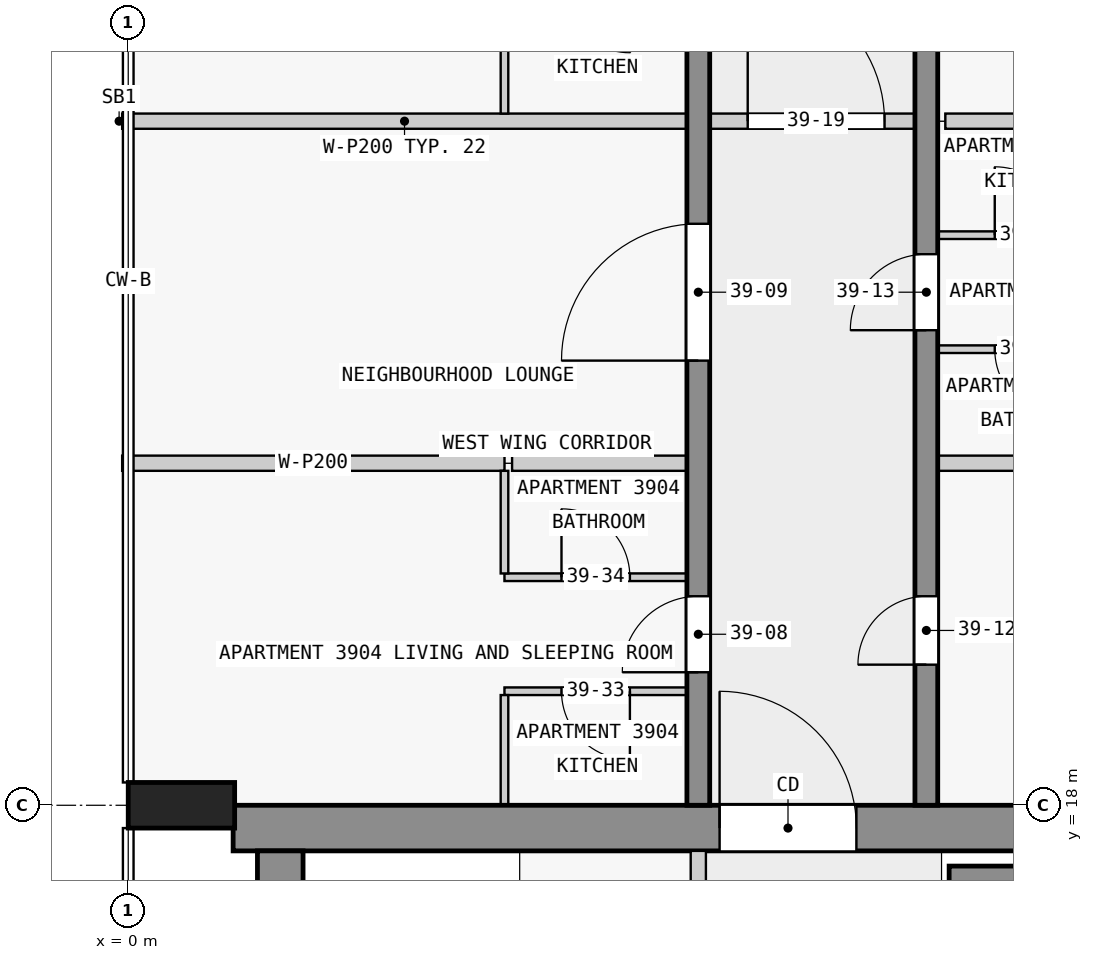
"""IFC4 building model, lengths in metres.
Left out: names, types, materials, properties, quantities, classifications, styles, units other than length and angle.
Written with IfcOpenShell. Run it as: python <this file> out.ifc"""

import sys

from ifc_helpers import new_model, si_unit, direction, frame, frame_2d, origin, origin_2d, place, context, subcontext, project, spatial, rectangle, extrude, element, fill, save


model = new_model("IFC4")
c1 = context("Model", 3, precision=1e-05, world=origin(), true_north=direction((0.0, 1.0)))
c2 = subcontext(c1, "Body", "Model", "MODEL_VIEW")
j1 = project(units=[si_unit("LENGTHUNIT", "METRE"), si_unit("PLANEANGLEUNIT", "RADIAN")], contexts=[c1])
p1 = place(None, origin())
s1 = spatial("IfcSite", under=j1, at=p1, CompositionType="ELEMENT")
p2 = place(p1, origin())
s2 = spatial("IfcBuilding", under=s1, at=p2, CompositionType="ELEMENT")
p3 = place(p2, frame((0.0, 0.0, 153.4)))
s3 = spatial("IfcBuildingStorey", under=s2, at=p3, CompositionType="ELEMENT", Elevation=153.4)
p4 = place(p3, frame((0.7, 18.0, 0.0), z_axis=(0.0, 0.0, 1.0), x_axis=(0.0, 1.0, 0.0)))
e1 = element("IfcColumn", 1, at=p4, inside=s3, PredefinedType="COLUMN", context=c2, shape_type="SweptSolid", body=[
    extrude(rectangle(XDim=0.6, YDim=1.4, at=origin_2d()), origin(), (0.0, 0.0, 1.0), 3.5),
])
p5 = place(p3, frame((1.38, 17.7, 0.0), z_axis=(0.0, 0.0, 1.0), x_axis=(1.0, 0.0, 0.0)))
e2 = element("IfcWall", 2, at=p5, inside=s3, PredefinedType="SHEAR", context=c2, shape_type="SweptSolid", body=[
    extrude(rectangle(XDim=21.12, YDim=0.6, at=frame_2d((10.56, 0.0))), origin(), (0.0, 0.0, 1.0), 3.25),
])
p6 = place(p5, frame((6.4, 0.0, 0.0)))
e3 = element("IfcOpeningElement", 3, at=p6, cuts=e2, PredefinedType="OPENING", context=c2, shape_type="SweptSolid", body=[
    extrude(rectangle(XDim=1.8, YDim=2.1, at=frame_2d((0.9, 1.05))), frame((0.0, 0.31, 0.0), z_axis=(0.0, -1.0, 0.0), x_axis=(1.0, 0.0, 0.0)), (0.0, 0.0, 1.0), 0.62),
])
p7 = place(p3, frame((2.0, 2.5, 0.0), z_axis=(0.0, 0.0, 1.0), x_axis=(0.0, 1.0, 0.0)))
e4 = element("IfcWall", 4, at=p7, inside=s3, PredefinedType="SHEAR", context=c2, shape_type="SweptSolid", body=[
    extrude(rectangle(XDim=14.9, YDim=0.6, at=frame_2d((7.45, 0.0))), origin(), (0.0, 0.0, 1.0), 3.25),
])
p8 = place(p3, frame((10.8, 17.05, 0.0), z_axis=(0.0, 0.0, 1.0), x_axis=(1.0, 0.0, 0.0)))
e5 = element("IfcWall", 5, at=p8, inside=s3, PredefinedType="SHEAR", context=c2, shape_type="SweptSolid", body=[
    extrude(rectangle(XDim=7.8, YDim=0.3, at=frame_2d((3.9, 0.0))), origin(), (0.0, 0.0, 1.0), 3.25),
])
p9 = place(p3, frame((7.5, 18.0, 0.0), z_axis=(0.0, 0.0, 1.0), x_axis=(0.0, 1.0, 0.0)))
e6 = element("IfcWall", 6, at=p9, inside=s3, PredefinedType="SHEAR", context=c2, shape_type="SweptSolid", body=[
    extrude(rectangle(XDim=27.0, YDim=0.3, at=frame_2d((13.5, 0.0))), origin(), (0.0, 0.0, 1.0), 3.25),
])
p10 = place(p9, frame((1.75, 0.0, 0.0)))
e7 = element("IfcOpeningElement", 7, at=p10, cuts=e6, PredefinedType="OPENING", context=c2, shape_type="SweptSolid", body=[
    extrude(rectangle(XDim=1.0, YDim=2.1, at=frame_2d((0.5, 1.05))), frame((0.0, 0.16, 0.0), z_axis=(0.0, -1.0, 0.0), x_axis=(1.0, 0.0, 0.0)), (0.0, 0.0, 1.0), 0.32),
])
p11 = place(p9, frame((5.85, 0.0, 0.0)))
e8 = element("IfcOpeningElement", 8, at=p11, cuts=e6, PredefinedType="OPENING", context=c2, shape_type="SweptSolid", body=[
    extrude(rectangle(XDim=1.8, YDim=2.1, at=frame_2d((0.9, 1.05))), frame((0.0, 0.16, 0.0), z_axis=(0.0, -1.0, 0.0), x_axis=(1.0, 0.0, 0.0)), (0.0, 0.0, 1.0), 0.32),
])
p12 = place(p9, frame((13.05, 0.0, 0.0)))
e9 = element("IfcOpeningElement", 9, at=p12, cuts=e6, PredefinedType="OPENING", context=c2, shape_type="SweptSolid", body=[
    extrude(rectangle(XDim=1.0, YDim=2.1, at=frame_2d((0.5, 1.05))), frame((0.0, 0.16, 0.0), z_axis=(0.0, -1.0, 0.0), x_axis=(1.0, 0.0, 0.0)), (0.0, 0.0, 1.0), 0.32),
])
p13 = place(p9, frame((21.35, 0.0, 0.0)))
e10 = element("IfcOpeningElement", 10, at=p13, cuts=e6, PredefinedType="OPENING", context=c2, shape_type="SweptSolid", body=[
    extrude(rectangle(XDim=1.0, YDim=2.1, at=frame_2d((0.5, 1.05))), frame((0.0, 0.16, 0.0), z_axis=(0.0, -1.0, 0.0), x_axis=(1.0, 0.0, 0.0)), (0.0, 0.0, 1.0), 0.32),
])
p14 = place(p3, frame((10.5, 18.0, 0.0), z_axis=(0.0, 0.0, 1.0), x_axis=(0.0, 1.0, 0.0)))
e11 = element("IfcWall", 11, at=p14, inside=s3, PredefinedType="SHEAR", context=c2, shape_type="SweptSolid", body=[
    extrude(rectangle(XDim=27.0, YDim=0.3, at=frame_2d((13.5, 0.0))), origin(), (0.0, 0.0, 1.0), 3.25),
])
p15 = place(p14, frame((1.85, 0.0, 0.0)))
e12 = element("IfcOpeningElement", 12, at=p15, cuts=e11, PredefinedType="OPENING", context=c2, shape_type="SweptSolid", body=[
    extrude(rectangle(XDim=0.9, YDim=2.1, at=frame_2d((0.45, 1.05))), frame((0.0, 0.16, 0.0), z_axis=(0.0, -1.0, 0.0), x_axis=(1.0, 0.0, 0.0)), (0.0, 0.0, 1.0), 0.32),
])
p16 = place(p14, frame((6.25, 0.0, 0.0)))
e13 = element("IfcOpeningElement", 13, at=p16, cuts=e11, PredefinedType="OPENING", context=c2, shape_type="SweptSolid", body=[
    extrude(rectangle(XDim=1.0, YDim=2.1, at=frame_2d((0.5, 1.05))), frame((0.0, 0.16, 0.0), z_axis=(0.0, -1.0, 0.0), x_axis=(1.0, 0.0, 0.0)), (0.0, 0.0, 1.0), 0.32),
])
p17 = place(p14, frame((10.85, 0.0, 0.0)))
e14 = element("IfcOpeningElement", 14, at=p17, cuts=e11, PredefinedType="OPENING", context=c2, shape_type="SweptSolid", body=[
    extrude(rectangle(XDim=0.9, YDim=2.1, at=frame_2d((0.45, 1.05))), frame((0.0, 0.16, 0.0), z_axis=(0.0, -1.0, 0.0), x_axis=(1.0, 0.0, 0.0)), (0.0, 0.0, 1.0), 0.32),
])
p18 = place(p14, frame((17.55, 0.0, 0.0)))
e15 = element("IfcOpeningElement", 15, at=p18, cuts=e11, PredefinedType="OPENING", context=c2, shape_type="SweptSolid", body=[
    extrude(rectangle(XDim=1.0, YDim=2.1, at=frame_2d((0.5, 1.05))), frame((0.0, 0.16, 0.0), z_axis=(0.0, -1.0, 0.0), x_axis=(1.0, 0.0, 0.0)), (0.0, 0.0, 1.0), 0.32),
])
p19 = place(p14, frame((23.25, 0.0, 0.0)))
e16 = element("IfcOpeningElement", 16, at=p19, cuts=e11, PredefinedType="OPENING", context=c2, shape_type="SweptSolid", body=[
    extrude(rectangle(XDim=0.9, YDim=2.1, at=frame_2d((0.45, 1.05))), frame((0.0, 0.16, 0.0), z_axis=(0.0, -1.0, 0.0), x_axis=(1.0, 0.0, 0.0)), (0.0, 0.0, 1.0), 0.32),
])
p20 = place(p14, frame((25.45, 0.0, 0.0)))
e17 = element("IfcOpeningElement", 17, at=p20, cuts=e11, PredefinedType="OPENING", context=c2, shape_type="SweptSolid", body=[
    extrude(rectangle(XDim=1.0, YDim=2.1, at=frame_2d((0.5, 1.05))), frame((0.0, 0.16, 0.0), z_axis=(0.0, -1.0, 0.0), x_axis=(1.0, 0.0, 0.0)), (0.0, 0.0, 1.0), 0.32),
])
p21 = place(p3, frame((7.5, 10.1, 0.0), z_axis=(0.0, 0.0, 1.0), x_axis=(0.0, 1.0, 0.0)))
e18 = element("IfcWall", 18, at=p21, inside=s3, PredefinedType="PARTITIONING", context=c2, shape_type="SweptSolid", body=[
    extrude(rectangle(XDim=7.3, YDim=0.2, at=frame_2d((3.65, 0.0))), origin(), (0.0, 0.0, 1.0), 3.25),
])
p22 = place(p21, frame((0.75, 0.0, 0.0)))
e19 = element("IfcOpeningElement", 19, at=p22, cuts=e18, PredefinedType="OPENING", context=c2, shape_type="SweptSolid", body=[
    extrude(rectangle(XDim=0.9, YDim=2.1, at=frame_2d((0.45, 1.05))), frame((0.0, 0.11, 0.0), z_axis=(0.0, -1.0, 0.0), x_axis=(1.0, 0.0, 0.0)), (0.0, 0.0, 1.0), 0.22),
])
p23 = place(p21, frame((3.175, 0.0, 0.0)))
e20 = element("IfcOpeningElement", 20, at=p23, cuts=e18, PredefinedType="OPENING", context=c2, shape_type="SweptSolid", body=[
    extrude(rectangle(XDim=0.9, YDim=2.1, at=frame_2d((0.45, 1.05))), frame((0.0, 0.11, 0.0), z_axis=(0.0, -1.0, 0.0), x_axis=(1.0, 0.0, 0.0)), (0.0, 0.0, 1.0), 0.22),
])
p24 = place(p21, frame((5.25, 0.0, 0.0)))
e21 = element("IfcOpeningElement", 21, at=p24, cuts=e18, PredefinedType="OPENING", context=c2, shape_type="SweptSolid", body=[
    extrude(rectangle(XDim=0.9, YDim=2.1, at=frame_2d((0.45, 1.05))), frame((0.0, 0.11, 0.0), z_axis=(0.0, -1.0, 0.0), x_axis=(1.0, 0.0, 0.0)), (0.0, 0.0, 1.0), 0.22),
])
p25 = place(p3, frame((7.35, 19.5, 0.0), z_axis=(0.0, 0.0, 1.0), x_axis=(-1.0, 0.0, 0.0)))
e22 = element("IfcWall", 22, at=p25, inside=s3, PredefinedType="PARTITIONING", context=c2, shape_type="SweptSolid", body=[
    extrude(rectangle(XDim=2.4, YDim=0.1, at=frame_2d((1.2, 0.0))), origin(), (0.0, 0.0, 1.0), 3.25),
])
p26 = place(p25, frame((0.75, 0.0, 0.0)))
e23 = element("IfcOpeningElement", 23, at=p26, cuts=e22, PredefinedType="OPENING", context=c2, shape_type="SweptSolid", body=[
    extrude(rectangle(XDim=0.9, YDim=2.1, at=frame_2d((0.45, 1.05))), frame((0.0, 0.06, 0.0), z_axis=(0.0, -1.0, 0.0), x_axis=(1.0, 0.0, 0.0)), (0.0, 0.0, 1.0), 0.12),
])
p27 = place(p3, frame((4.95, 21.0, 0.0), z_axis=(0.0, 0.0, 1.0), x_axis=(1.0, 0.0, 0.0)))
e24 = element("IfcWall", 24, at=p27, inside=s3, PredefinedType="PARTITIONING", context=c2, shape_type="SweptSolid", body=[
    extrude(rectangle(XDim=2.4, YDim=0.1, at=frame_2d((1.2, 0.0))), origin(), (0.0, 0.0, 1.0), 3.25),
])
p28 = place(p27, frame((0.75, 0.0, 0.0)))
e25 = element("IfcOpeningElement", 25, at=p28, cuts=e24, PredefinedType="OPENING", context=c2, shape_type="SweptSolid", body=[
    extrude(rectangle(XDim=0.9, YDim=2.1, at=frame_2d((0.45, 1.05))), frame((0.0, 0.06, 0.0), z_axis=(0.0, -1.0, 0.0), x_axis=(1.0, 0.0, 0.0)), (0.0, 0.0, 1.0), 0.12),
])
p29 = place(p3, frame((7.35, 22.5, 0.0), z_axis=(0.0, 0.0, 1.0), x_axis=(-1.0, 0.0, 0.0)))
e26 = element("IfcWall", 26, at=p29, inside=s3, PredefinedType="PARTITIONING", context=c2, shape_type="SweptSolid", body=[
    extrude(rectangle(XDim=2.3, YDim=0.2, at=frame_2d((1.15, 0.0))), origin(), (0.0, 0.0, 1.0), 3.25),
])
p30 = place(p3, frame((17.85, 22.5, 0.0), z_axis=(0.0, 0.0, 1.0), x_axis=(-1.0, 0.0, 0.0)))
e27 = element("IfcWall", 27, at=p30, inside=s3, PredefinedType="PARTITIONING", context=c2, shape_type="SweptSolid", body=[
    extrude(rectangle(XDim=7.2, YDim=0.2, at=frame_2d((3.6, 0.0))), origin(), (0.0, 0.0, 1.0), 3.25),
])
p31 = place(p3, frame((-0.08, 22.5, 0.0), z_axis=(0.0, 0.0, 1.0), x_axis=(1.0, 0.0, 0.0)))
e28 = element("IfcWall", 28, at=p31, inside=s3, PredefinedType="PARTITIONING", context=c2, shape_type="SweptSolid", body=[
    extrude(rectangle(XDim=5.03, YDim=0.2, at=frame_2d((2.515, 0.0))), origin(), (0.0, 0.0, 1.0), 3.25),
])
p32 = place(p3, frame((13.05, 24.0, 0.0), z_axis=(0.0, 0.0, 1.0), x_axis=(-1.0, 0.0, 0.0)))
e29 = element("IfcWall", 29, at=p32, inside=s3, PredefinedType="PARTITIONING", context=c2, shape_type="SweptSolid", body=[
    extrude(rectangle(XDim=2.4, YDim=0.1, at=frame_2d((1.2, 0.0))), origin(), (0.0, 0.0, 1.0), 3.25),
])
p33 = place(p32, frame((0.75, 0.0, 0.0)))
e30 = element("IfcOpeningElement", 30, at=p33, cuts=e29, PredefinedType="OPENING", context=c2, shape_type="SweptSolid", body=[
    extrude(rectangle(XDim=0.9, YDim=2.1, at=frame_2d((0.45, 1.05))), frame((0.0, 0.06, 0.0), z_axis=(0.0, -1.0, 0.0), x_axis=(1.0, 0.0, 0.0)), (0.0, 0.0, 1.0), 0.12),
])
p34 = place(p3, frame((10.65, 25.5, 0.0), z_axis=(0.0, 0.0, 1.0), x_axis=(1.0, 0.0, 0.0)))
e31 = element("IfcWall", 31, at=p34, inside=s3, PredefinedType="PARTITIONING", context=c2, shape_type="SweptSolid", body=[
    extrude(rectangle(XDim=2.4, YDim=0.1, at=frame_2d((1.2, 0.0))), origin(), (0.0, 0.0, 1.0), 3.25),
])
p35 = place(p34, frame((0.75, 0.0, 0.0)))
e32 = element("IfcOpeningElement", 32, at=p35, cuts=e31, PredefinedType="OPENING", context=c2, shape_type="SweptSolid", body=[
    extrude(rectangle(XDim=0.9, YDim=2.1, at=frame_2d((0.45, 1.05))), frame((0.0, 0.06, 0.0), z_axis=(0.0, -1.0, 0.0), x_axis=(1.0, 0.0, 0.0)), (0.0, 0.0, 1.0), 0.12),
])
p36 = place(p3, frame((7.35, 27.0, 0.0), z_axis=(0.0, 0.0, 1.0), x_axis=(-1.0, 0.0, 0.0)))
e33 = element("IfcWall", 33, at=p36, inside=s3, PredefinedType="PARTITIONING", context=c2, shape_type="SweptSolid", body=[
    extrude(rectangle(XDim=7.43, YDim=0.2, at=frame_2d((3.715, 0.0))), origin(), (0.0, 0.0, 1.0), 3.25),
])
p37 = place(p3, frame((12.95, 27.0, 0.0), z_axis=(0.0, 0.0, 1.0), x_axis=(-1.0, 0.0, 0.0)))
e34 = element("IfcWall", 34, at=p37, inside=s3, PredefinedType="PARTITIONING", context=c2, shape_type="SweptSolid", body=[
    extrude(rectangle(XDim=2.2, YDim=0.2, at=frame_2d((1.1, 0.0))), origin(), (0.0, 0.0, 1.0), 3.25),
])
p38 = place(p3, frame((4.95, 19.45, 0.0), z_axis=(0.0, 0.0, 1.0), x_axis=(0.0, -1.0, 0.0)))
e35 = element("IfcWall", 35, at=p38, inside=s3, PredefinedType="PARTITIONING", context=c2, shape_type="SweptSolid", body=[
    extrude(rectangle(XDim=1.45, YDim=0.1, at=frame_2d((0.725, 0.0))), origin(), (0.0, 0.0, 1.0), 3.25),
])
p39 = place(p3, frame((4.95, 22.4, 0.0), z_axis=(0.0, 0.0, 1.0), x_axis=(0.0, -1.0, 0.0)))
e36 = element("IfcWall", 36, at=p39, inside=s3, PredefinedType="PARTITIONING", context=c2, shape_type="SweptSolid", body=[
    extrude(rectangle(XDim=1.35, YDim=0.1, at=frame_2d((0.675, 0.0))), origin(), (0.0, 0.0, 1.0), 3.25),
])
p40 = place(p3, frame((4.95, 28.75, 0.0), z_axis=(0.0, 0.0, 1.0), x_axis=(0.0, -1.0, 0.0)))
e37 = element("IfcWall", 37, at=p40, inside=s3, PredefinedType="PARTITIONING", context=c2, shape_type="SweptSolid", body=[
    extrude(rectangle(XDim=1.65, YDim=0.1, at=frame_2d((0.825, 0.0))), origin(), (0.0, 0.0, 1.0), 3.25),
])
p41 = place(p3, frame((7.45, 27.0, 0.0), z_axis=(0.0, 0.0, 1.0), x_axis=(1.0, 0.0, 0.0)))
e38 = element("IfcWall", 38, at=p41, inside=s3, PredefinedType="PARTITIONING", context=c2, shape_type="SweptSolid", body=[
    extrude(rectangle(XDim=3.2, YDim=0.2, at=frame_2d((1.6, 0.0))), origin(), (0.0, 0.0, 1.0), 3.25),
])
p42 = place(p41, frame((0.7, 0.0, 0.0)))
e39 = element("IfcOpeningElement", 39, at=p42, cuts=e38, PredefinedType="OPENING", context=c2, shape_type="SweptSolid", body=[
    extrude(rectangle(XDim=1.8, YDim=2.1, at=frame_2d((0.9, 1.05))), frame((0.0, 0.11, 0.0), z_axis=(0.0, -1.0, 0.0), x_axis=(1.0, 0.0, 0.0)), (0.0, 0.0, 1.0), 0.22),
])
p43 = place(p6, origin())
e40 = element("IfcDoor", 40, at=p43, inside=s3, OperationType="DOUBLE_DOOR_SINGLE_SWING", PredefinedType="DOOR", context=c2, shape_type="SweptSolid", body=[
    extrude(rectangle(XDim=1.8, YDim=2.1, at=frame_2d((0.9, 1.05))), frame((0.0, 0.025, 0.0), z_axis=(0.0, -1.0, 0.0), x_axis=(1.0, 0.0, 0.0)), (0.0, 0.0, 1.0), 0.05),
])
fill(e3, e40)
p44 = place(p10, origin())
e41 = element("IfcDoor", 41, at=p44, inside=s3, OperationType="SINGLE_SWING_LEFT", PredefinedType="DOOR", context=c2, shape_type="SweptSolid", body=[
    extrude(rectangle(XDim=1.0, YDim=2.1, at=frame_2d((0.5, 1.05))), frame((0.0, 0.025, 0.0), z_axis=(0.0, -1.0, 0.0), x_axis=(1.0, 0.0, 0.0)), (0.0, 0.0, 1.0), 0.05),
])
fill(e7, e41)
p45 = place(p11, origin())
e42 = element("IfcDoor", 42, at=p45, inside=s3, OperationType="SINGLE_SWING_LEFT", PredefinedType="DOOR", context=c2, shape_type="SweptSolid", body=[
    extrude(rectangle(XDim=1.8, YDim=2.1, at=frame_2d((0.9, 1.05))), frame((0.0, 0.025, 0.0), z_axis=(0.0, -1.0, 0.0), x_axis=(1.0, 0.0, 0.0)), (0.0, 0.0, 1.0), 0.05),
])
fill(e8, e42)
p46 = place(p15, origin())
e43 = element("IfcDoor", 43, at=p46, inside=s3, OperationType="SINGLE_SWING_LEFT", PredefinedType="DOOR", context=c2, shape_type="SweptSolid", body=[
    extrude(rectangle(XDim=0.9, YDim=2.1, at=frame_2d((0.45, 1.05))), frame((0.0, 0.025, 0.0), z_axis=(0.0, -1.0, 0.0), x_axis=(1.0, 0.0, 0.0)), (0.0, 0.0, 1.0), 0.05),
])
fill(e12, e43)
p47 = place(p16, origin())
e44 = element("IfcDoor", 44, at=p47, inside=s3, OperationType="SINGLE_SWING_LEFT", PredefinedType="DOOR", context=c2, shape_type="SweptSolid", body=[
    extrude(rectangle(XDim=1.0, YDim=2.1, at=frame_2d((0.5, 1.05))), frame((0.0, 0.025, 0.0), z_axis=(0.0, -1.0, 0.0), x_axis=(1.0, 0.0, 0.0)), (0.0, 0.0, 1.0), 0.05),
])
fill(e13, e44)
p48 = place(p42, origin())
e45 = element("IfcDoor", 45, at=p48, inside=s3, OperationType="SINGLE_SWING_LEFT", PredefinedType="DOOR", context=c2, shape_type="SweptSolid", body=[
    extrude(rectangle(XDim=1.8, YDim=2.1, at=frame_2d((0.9, 1.05))), frame((0.0, 0.025, 0.0), z_axis=(0.0, -1.0, 0.0), x_axis=(1.0, 0.0, 0.0)), (0.0, 0.0, 1.0), 0.05),
])
fill(e39, e45)
p49 = place(p26, origin())
e46 = element("IfcDoor", 46, at=p49, inside=s3, OperationType="SINGLE_SWING_RIGHT", PredefinedType="DOOR", context=c2, shape_type="SweptSolid", body=[
    extrude(rectangle(XDim=0.9, YDim=2.1, at=frame_2d((0.45, 1.05))), frame((0.0, 0.025, 0.0), z_axis=(0.0, -1.0, 0.0), x_axis=(1.0, 0.0, 0.0)), (0.0, 0.0, 1.0), 0.05),
])
fill(e23, e46)
p50 = place(p28, origin())
e47 = element("IfcDoor", 47, at=p50, inside=s3, OperationType="SINGLE_SWING_RIGHT", PredefinedType="DOOR", context=c2, shape_type="SweptSolid", body=[
    extrude(rectangle(XDim=0.9, YDim=2.1, at=frame_2d((0.45, 1.05))), frame((0.0, 0.025, 0.0), z_axis=(0.0, -1.0, 0.0), x_axis=(1.0, 0.0, 0.0)), (0.0, 0.0, 1.0), 0.05),
])
fill(e25, e47)
p51 = place(p33, origin())
e48 = element("IfcDoor", 48, at=p51, inside=s3, OperationType="SINGLE_SWING_LEFT", PredefinedType="DOOR", context=c2, shape_type="SweptSolid", body=[
    extrude(rectangle(XDim=0.9, YDim=2.1, at=frame_2d((0.45, 1.05))), frame((0.0, 0.025, 0.0), z_axis=(0.0, -1.0, 0.0), x_axis=(1.0, 0.0, 0.0)), (0.0, 0.0, 1.0), 0.05),
])
fill(e30, e48)
p52 = place(p35, origin())
e49 = element("IfcDoor", 49, at=p52, inside=s3, OperationType="SINGLE_SWING_LEFT", PredefinedType="DOOR", context=c2, shape_type="SweptSolid", body=[
    extrude(rectangle(XDim=0.9, YDim=2.1, at=frame_2d((0.45, 1.05))), frame((0.0, 0.025, 0.0), z_axis=(0.0, -1.0, 0.0), x_axis=(1.0, 0.0, 0.0)), (0.0, 0.0, 1.0), 0.05),
])
fill(e32, e49)
save(model, sys.argv[1])
